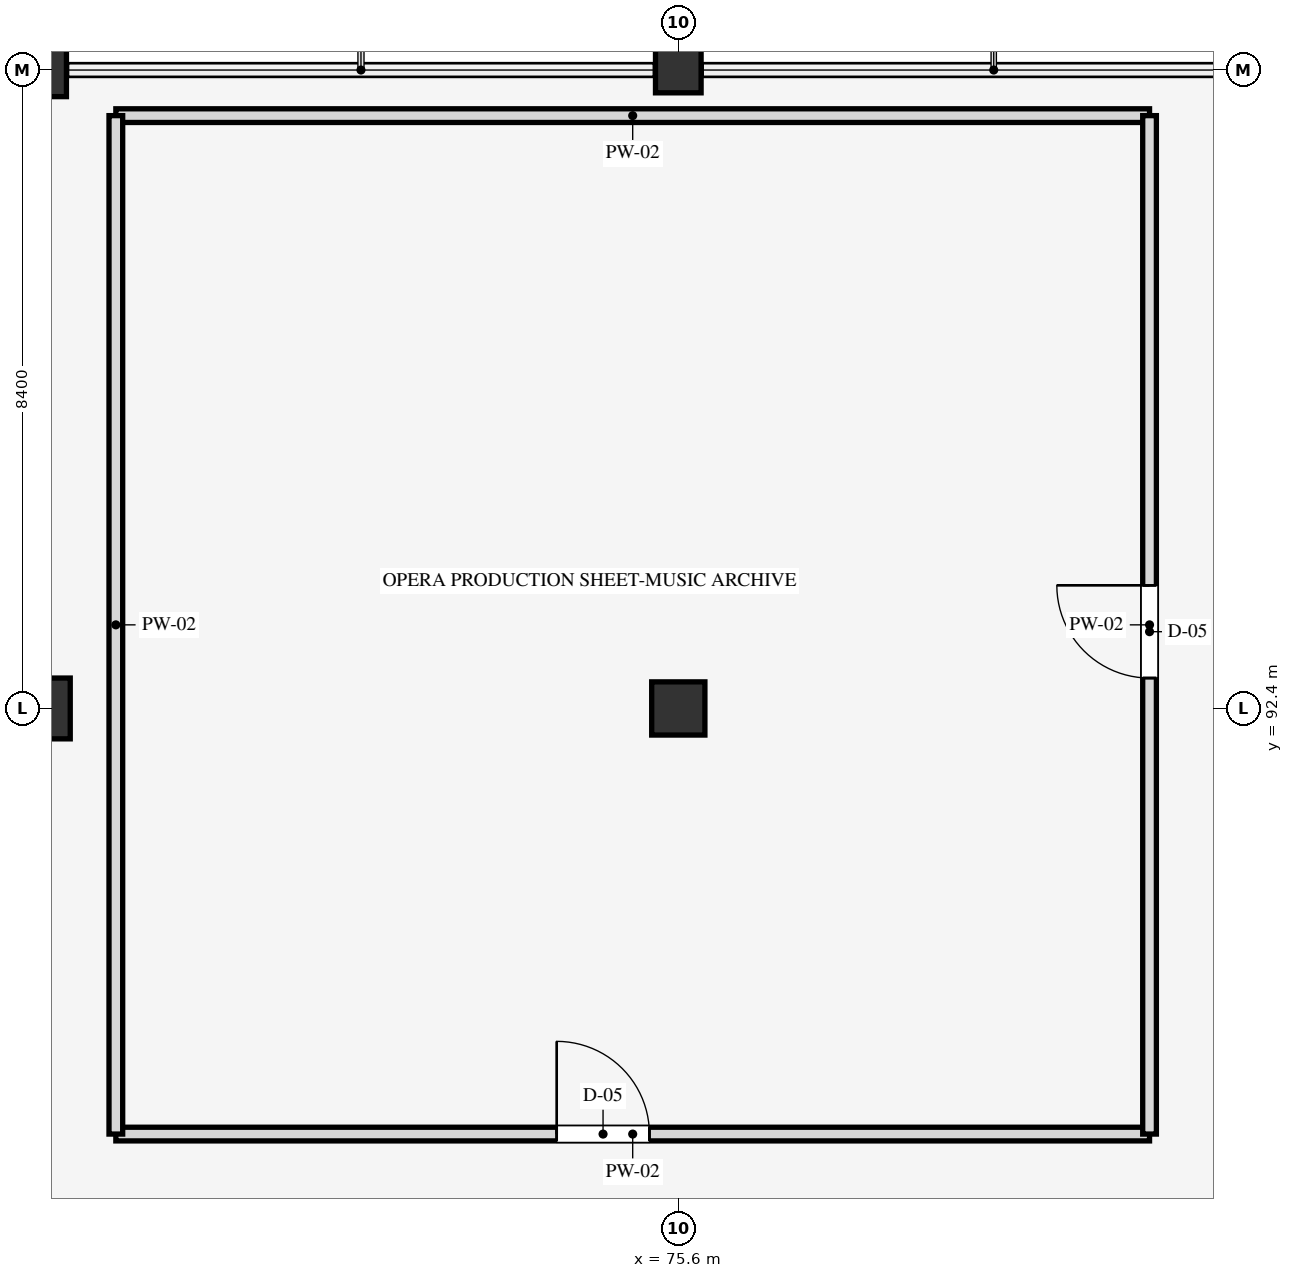
"""IFC4 building model, lengths in metres.
Left out: names, types, materials, properties, quantities, classifications, styles, units other than length and angle.
Written with IfcOpenShell. Run it as: python <this file> out.ifc"""

import sys

from ifc_helpers import new_model, si_unit, direction, frame, frame_2d, origin, origin_2d, place, context, subcontext, project, spatial, rectangle, extrude, element, fill, save


model = new_model("IFC4")
c1 = context("Model", 3, precision=1e-05, world=origin(), true_north=direction((0.0, 1.0)))
c2 = subcontext(c1, "Body", "Model", "MODEL_VIEW")
j1 = project(units=[si_unit("LENGTHUNIT", "METRE"), si_unit("PLANEANGLEUNIT", "RADIAN")], contexts=[c1])
p1 = place(None, origin())
s1 = spatial("IfcSite", under=j1, at=p1, CompositionType="ELEMENT")
p2 = place(p1, origin())
s2 = spatial("IfcBuilding", under=s1, at=p2, CompositionType="ELEMENT")
p3 = place(p2, frame((0.0, 0.0, 18.9)))
s3 = spatial("IfcBuildingStorey", under=s2, at=p3, CompositionType="ELEMENT", Elevation=18.9)
p4 = place(p3, frame((67.2, 92.4, 0.0), z_axis=(0.0, 0.0, 1.0), x_axis=(1.0, 0.0, 0.0)))
e1 = element("IfcColumn", 1, at=p4, inside=s3, PredefinedType="COLUMN", context=c2, shape_type="SweptSolid", body=[
    extrude(rectangle(XDim=0.8, YDim=0.8, at=origin_2d()), origin(), (0.0, 0.0, 1.0), 4.5),
])
for number, where, z_axis, x_axis in (
    (2, (67.2, 100.8, 0.0), (0.0, 0.0, 1.0), (1.0, 0.0, 0.0)),
    (3, (75.6, 92.4, 0.0), (0.0, 0.0, 1.0), (1.0, 0.0, 0.0)),
):
    element("IfcColumn", number, at=place(p3, frame(where, z_axis=z_axis, x_axis=x_axis)), inside=s3, PredefinedType="COLUMN", context=c2, shape_type="SweptSolid", body=[
        extrude(rectangle(XDim=0.7, YDim=0.7, at=origin_2d()), origin(), (0.0, 0.0, 1.0), 4.5),
    ])
p5 = place(p3, frame((75.6, 100.8, 0.0), z_axis=(0.0, 0.0, 1.0), x_axis=(1.0, 0.0, 0.0)))
e4 = element("IfcColumn", 4, at=p5, inside=s3, PredefinedType="COLUMN", context=c2, shape_type="SweptSolid", body=[
    extrude(rectangle(XDim=0.6, YDim=0.6, at=origin_2d()), origin(), (0.0, 0.0, 1.0), 4.5),
])
p6 = place(p3, frame((68.2, 86.8, 0.0), z_axis=(0.0, 0.0, 1.0), x_axis=(1.0, 0.0, 0.0)))
e5 = element("IfcWall", 5, at=p6, inside=s3, PredefinedType="PARTITIONING", context=c2, shape_type="SweptSolid", body=[
    extrude(rectangle(XDim=13.6, YDim=0.18, at=frame_2d((6.8, 0.0))), origin(), (0.0, 0.0, 1.0), 3.54),
])
p7 = place(p6, frame((5.8, 0.0, 0.0)))
e6 = element("IfcOpeningElement", 6, at=p7, cuts=e5, PredefinedType="OPENING", context=c2, shape_type="SweptSolid", body=[
    extrude(rectangle(XDim=1.22, YDim=2.15, at=frame_2d((0.61, 1.075))), frame((0.0, 0.1, 0.0), z_axis=(0.0, -1.0, 0.0), x_axis=(1.0, 0.0, 0.0)), (0.0, 0.0, 1.0), 0.2),
])
p8 = place(p3, frame((68.2, 100.2, 0.0), z_axis=(0.0, 0.0, 1.0), x_axis=(1.0, 0.0, 0.0)))
e7 = element("IfcWall", 7, at=p8, inside=s3, PredefinedType="PARTITIONING", context=c2, shape_type="SweptSolid", body=[
    extrude(rectangle(XDim=13.6, YDim=0.18, at=frame_2d((6.8, 0.0))), origin(), (0.0, 0.0, 1.0), 3.54),
])
p9 = place(p3, frame((68.2, 86.8, 0.0), z_axis=(0.0, 0.0, 1.0), x_axis=(0.0, 1.0, 0.0)))
e8 = element("IfcWall", 8, at=p9, inside=s3, PredefinedType="PARTITIONING", context=c2, shape_type="SweptSolid", body=[
    extrude(rectangle(XDim=13.4, YDim=0.18, at=frame_2d((6.7, 0.0))), origin(), (0.0, 0.0, 1.0), 3.54),
])
p10 = place(p3, frame((81.8, 86.8, 0.0), z_axis=(0.0, 0.0, 1.0), x_axis=(0.0, 1.0, 0.0)))
e9 = element("IfcWall", 9, at=p10, inside=s3, PredefinedType="PARTITIONING", context=c2, shape_type="SweptSolid", body=[
    extrude(rectangle(XDim=13.4, YDim=0.18, at=frame_2d((6.7, 0.0))), origin(), (0.0, 0.0, 1.0), 3.54),
])
p11 = place(p10, frame((6.0, 0.0, 0.0)))
e10 = element("IfcOpeningElement", 10, at=p11, cuts=e9, PredefinedType="OPENING", context=c2, shape_type="SweptSolid", body=[
    extrude(rectangle(XDim=1.22, YDim=2.15, at=frame_2d((0.61, 1.075))), frame((0.0, 0.1, 0.0), z_axis=(0.0, -1.0, 0.0), x_axis=(1.0, 0.0, 0.0)), (0.0, 0.0, 1.0), 0.2),
])
p12 = place(p7, origin())
e11 = element("IfcDoor", 11, at=p12, inside=s3, OperationType="SINGLE_SWING_LEFT", PredefinedType="DOOR", context=c2, shape_type="SweptSolid", body=[
    extrude(rectangle(XDim=1.22, YDim=2.15, at=frame_2d((0.61, 1.075))), frame((0.0, 0.025, 0.0), z_axis=(0.0, -1.0, 0.0), x_axis=(1.0, 0.0, 0.0)), (0.0, 0.0, 1.0), 0.05),
])
fill(e6, e11)
p13 = place(p11, origin())
e12 = element("IfcDoor", 12, at=p13, inside=s3, OperationType="SINGLE_SWING_RIGHT", PredefinedType="DOOR", context=c2, shape_type="SweptSolid", body=[
    extrude(rectangle(XDim=1.22, YDim=2.15, at=frame_2d((0.61, 1.075))), frame((0.0, 0.025, 0.0), z_axis=(0.0, -1.0, 0.0), x_axis=(1.0, 0.0, 0.0)), (0.0, 0.0, 1.0), 0.05),
])
fill(e10, e12)
save(model, sys.argv[1])
